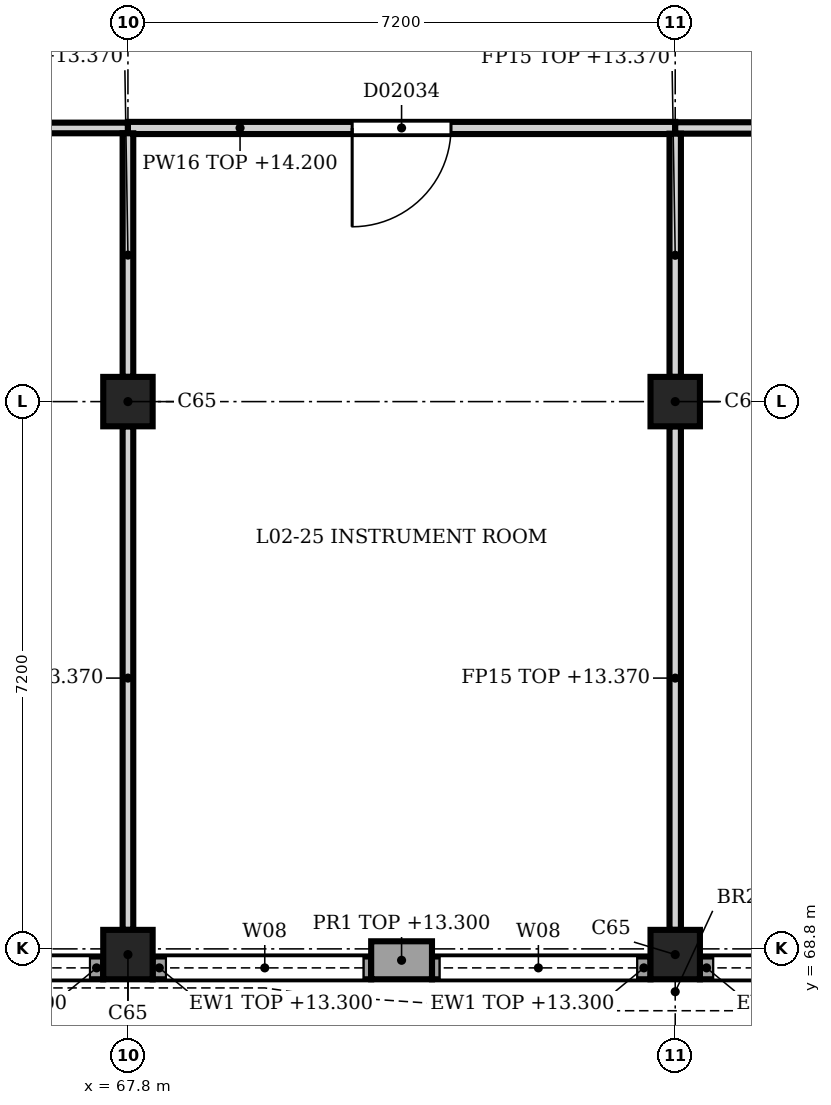
"""IFC4 building model, lengths in metres.
Left out: names, types, materials, properties, quantities, classifications, styles, units other than length and angle.
Written with IfcOpenShell. Run it as: python <this file> out.ifc"""

import sys

from ifc_helpers import new_model, si_unit, direction, frame, frame_2d, origin, origin_2d, place, context, subcontext, project, spatial, rectangle, extrude, element, fill, save


model = new_model("IFC4")
c1 = context("Model", 3, precision=1e-05, world=origin(), true_north=direction((0.0, 1.0)))
c2 = subcontext(c1, "Body", "Model", "MODEL_VIEW")
j1 = project(units=[si_unit("LENGTHUNIT", "METRE"), si_unit("PLANEANGLEUNIT", "RADIAN")], contexts=[c1])
p1 = place(None, origin())
s1 = spatial("IfcSite", under=j1, at=p1, CompositionType="ELEMENT")
p2 = place(p1, origin())
s2 = spatial("IfcBuilding", under=s1, at=p2, CompositionType="ELEMENT")
p3 = place(p2, frame((0.0, 0.0, 9.9)))
s3 = spatial("IfcBuildingStorey", under=s2, at=p3, CompositionType="ELEMENT", Elevation=9.9)
for number, where, z_axis, x_axis in (
    (1, (67.8, 68.725, 0.0), (0.0, 0.0, 1.0), (1.0, 0.0, 0.0)),
    (2, (67.8, 76.0, 0.0), (0.0, 0.0, 1.0), (1.0, 0.0, 0.0)),
    (3, (75.0, 68.725, 0.0), (0.0, 0.0, 1.0), (1.0, 0.0, 0.0)),
    (4, (75.0, 76.0, 0.0), (0.0, 0.0, 1.0), (1.0, 0.0, 0.0)),
):
    element("IfcColumn", number, at=place(p3, frame(where, z_axis=z_axis, x_axis=x_axis)), inside=s3, PredefinedType="COLUMN", context=c2, shape_type="SweptSolid", body=[
        extrude(rectangle(XDim=0.65, YDim=0.65, at=origin_2d()), origin(), (0.0, 0.0, 1.0), 4.5),
    ])
p4 = place(p3, frame((71.8, 68.65, 0.0), z_axis=(0.0, 0.0, 1.0), x_axis=(-1.0, 0.0, 0.0)))
e5 = element("IfcWall", 5, at=p4, inside=s3, PredefinedType="SOLIDWALL", context=c2, shape_type="SweptSolid", body=[
    extrude(rectangle(XDim=0.8, YDim=0.5, at=frame_2d((0.4, 0.0))), origin(), (0.0, 0.0, 1.0), 3.4),
])
p5 = place(p3, frame((78.2, 68.55, 0.0), z_axis=(0.0, 0.0, 1.0), x_axis=(-1.0, 0.0, 0.0)))
e6 = element("IfcWall", 6, at=p5, inside=s3, PredefinedType="SOLIDWALL", context=c2, shape_type="SweptSolid", body=[
    extrude(rectangle(XDim=2.875, YDim=0.3, at=frame_2d((1.438, 0.0))), origin(), (0.0, 0.0, 1.0), 3.4),
])
p6 = place(p5, frame((0.1, 0.0, 1.2)))
e7 = element("IfcOpeningElement", 7, at=p6, cuts=e6, PredefinedType="OPENING", context=c2, shape_type="SweptSolid", body=[
    extrude(rectangle(XDim=2.6, YDim=2.1, at=frame_2d((1.3, 1.05))), frame((0.0, 0.16, 0.0), z_axis=(0.0, -1.0, 0.0), x_axis=(1.0, 0.0, 0.0)), (0.0, 0.0, 1.0), 0.32),
])
p7 = place(p3, frame((74.675, 68.55, 0.0), z_axis=(0.0, 0.0, 1.0), x_axis=(-1.0, 0.0, 0.0)))
e8 = element("IfcWall", 8, at=p7, inside=s3, PredefinedType="SOLIDWALL", context=c2, shape_type="SweptSolid", body=[
    extrude(rectangle(XDim=2.875, YDim=0.3, at=frame_2d((1.438, 0.0))), origin(), (0.0, 0.0, 1.0), 3.4),
])
p8 = place(p7, frame((0.175, 0.0, 1.2)))
e9 = element("IfcOpeningElement", 9, at=p8, cuts=e8, PredefinedType="OPENING", context=c2, shape_type="SweptSolid", body=[
    extrude(rectangle(XDim=2.6, YDim=2.1, at=frame_2d((1.3, 1.05))), frame((0.0, 0.16, 0.0), z_axis=(0.0, -1.0, 0.0), x_axis=(1.0, 0.0, 0.0)), (0.0, 0.0, 1.0), 0.32),
])
p9 = place(p3, frame((71.0, 68.55, 0.0), z_axis=(0.0, 0.0, 1.0), x_axis=(-1.0, 0.0, 0.0)))
e10 = element("IfcWall", 10, at=p9, inside=s3, PredefinedType="SOLIDWALL", context=c2, shape_type="SweptSolid", body=[
    extrude(rectangle(XDim=2.875, YDim=0.3, at=frame_2d((1.438, 0.0))), origin(), (0.0, 0.0, 1.0), 3.4),
])
p10 = place(p9, frame((0.1, 0.0, 1.2)))
e11 = element("IfcOpeningElement", 11, at=p10, cuts=e10, PredefinedType="OPENING", context=c2, shape_type="SweptSolid", body=[
    extrude(rectangle(XDim=2.6, YDim=2.1, at=frame_2d((1.3, 1.05))), frame((0.0, 0.16, 0.0), z_axis=(0.0, -1.0, 0.0), x_axis=(1.0, 0.0, 0.0)), (0.0, 0.0, 1.0), 0.32),
])
p11 = place(p3, frame((67.475, 68.55, 0.0), z_axis=(0.0, 0.0, 1.0), x_axis=(-1.0, 0.0, 0.0)))
e12 = element("IfcWall", 12, at=p11, inside=s3, PredefinedType="SOLIDWALL", context=c2, shape_type="SweptSolid", body=[
    extrude(rectangle(XDim=2.875, YDim=0.3, at=frame_2d((1.438, 0.0))), origin(), (0.0, 0.0, 1.0), 3.4),
])
p12 = place(p11, frame((0.175, 0.0, 1.2)))
e13 = element("IfcOpeningElement", 13, at=p12, cuts=e12, PredefinedType="OPENING", context=c2, shape_type="SweptSolid", body=[
    extrude(rectangle(XDim=2.6, YDim=2.1, at=frame_2d((1.3, 1.05))), frame((0.0, 0.16, 0.0), z_axis=(0.0, -1.0, 0.0), x_axis=(1.0, 0.0, 0.0)), (0.0, 0.0, 1.0), 0.32),
])
p13 = place(p3, frame((67.8, 79.6, 0.0), z_axis=(0.0, 0.0, 1.0), x_axis=(-1.0, 0.0, 0.0)))
e14 = element("IfcWall", 14, at=p13, inside=s3, PredefinedType="PARTITIONING", context=c2, shape_type="SweptSolid", body=[
    extrude(rectangle(XDim=21.6, YDim=0.14, at=frame_2d((10.8, 0.0))), origin(), (0.0, 0.0, 1.0), 4.3),
])
p14 = place(p13, frame((10.25, 0.0, 0.0)))
e15 = element("IfcOpeningElement", 15, at=p14, cuts=e14, PredefinedType="OPENING", context=c2, shape_type="SweptSolid", body=[
    extrude(rectangle(XDim=1.2, YDim=2.1, at=frame_2d((0.6, 1.05))), frame((0.0, 0.08, 0.0), z_axis=(0.0, -1.0, 0.0), x_axis=(1.0, 0.0, 0.0)), (0.0, 0.0, 1.0), 0.16),
])
p15 = place(p3, frame((75.0, 79.6, 0.0), z_axis=(0.0, 0.0, 1.0), x_axis=(-1.0, 0.0, 0.0)))
e16 = element("IfcWall", 16, at=p15, inside=s3, PredefinedType="PARTITIONING", context=c2, shape_type="SweptSolid", body=[
    extrude(rectangle(XDim=7.2, YDim=0.16, at=frame_2d((3.6, 0.0))), origin(), (0.0, 0.0, 1.0), 4.3),
])
p16 = place(p15, frame((2.95, 0.0, 0.0)))
e17 = element("IfcOpeningElement", 17, at=p16, cuts=e16, PredefinedType="OPENING", context=c2, shape_type="SweptSolid", body=[
    extrude(rectangle(XDim=1.3, YDim=2.2, at=frame_2d((0.65, 1.1))), frame((0.0, 0.09, 0.0), z_axis=(0.0, -1.0, 0.0), x_axis=(1.0, 0.0, 0.0)), (0.0, 0.0, 1.0), 0.18),
])
p17 = place(p3, frame((82.2, 79.6, 0.0), z_axis=(0.0, 0.0, 1.0), x_axis=(-1.0, 0.0, 0.0)))
e18 = element("IfcWall", 18, at=p17, inside=s3, PredefinedType="PARTITIONING", context=c2, shape_type="SweptSolid", body=[
    extrude(rectangle(XDim=7.2, YDim=0.15, at=frame_2d((3.6, 0.0))), origin(), (0.0, 0.0, 1.0), 4.3),
])
p18 = place(p17, frame((3.15, 0.0, 0.0)))
e19 = element("IfcOpeningElement", 19, at=p18, cuts=e18, PredefinedType="OPENING", context=c2, shape_type="SweptSolid", body=[
    extrude(rectangle(XDim=1.0, YDim=2.1, at=frame_2d((0.5, 1.05))), frame((0.0, 0.085, 0.0), z_axis=(0.0, -1.0, 0.0), x_axis=(1.0, 0.0, 0.0)), (0.0, 0.0, 1.0), 0.17),
])
p19 = place(p3, frame((67.8, 69.05, 0.0), z_axis=(0.0, 0.0, 1.0), x_axis=(0.0, 1.0, 0.0)))
e20 = element("IfcWall", 20, at=p19, inside=s3, PredefinedType="PARTITIONING", context=c2, shape_type="SweptSolid", body=[
    extrude(rectangle(XDim=6.625, YDim=0.14, at=frame_2d((3.312, 0.0))), origin(), (0.0, 0.0, 1.0), 3.47),
])
p20 = place(p3, frame((67.8, 76.325, 0.0), z_axis=(0.0, 0.0, 1.0), x_axis=(0.0, 1.0, 0.0)))
e21 = element("IfcWall", 21, at=p20, inside=s3, PredefinedType="PARTITIONING", context=c2, shape_type="SweptSolid", body=[
    extrude(rectangle(XDim=3.205, YDim=0.14, at=frame_2d((1.603, 0.0))), origin(), (0.0, 0.0, 1.0), 3.47),
])
p21 = place(p3, frame((75.0, 69.05, 0.0), z_axis=(0.0, 0.0, 1.0), x_axis=(0.0, 1.0, 0.0)))
e22 = element("IfcWall", 22, at=p21, inside=s3, PredefinedType="PARTITIONING", context=c2, shape_type="SweptSolid", body=[
    extrude(rectangle(XDim=6.625, YDim=0.15, at=frame_2d((3.312, 0.0))), origin(), (0.0, 0.0, 1.0), 3.47),
])
p22 = place(p3, frame((75.0, 76.325, 0.0), z_axis=(0.0, 0.0, 1.0), x_axis=(0.0, 1.0, 0.0)))
e23 = element("IfcWall", 23, at=p22, inside=s3, PredefinedType="PARTITIONING", context=c2, shape_type="SweptSolid", body=[
    extrude(rectangle(XDim=3.2, YDim=0.15, at=frame_2d((1.6, 0.0))), origin(), (0.0, 0.0, 1.0), 3.47),
])
p23 = place(p6, origin())
e24 = element("IfcWindow", 24, at=p23, inside=s3, PartitioningType="SINGLE_PANEL", PredefinedType="WINDOW", context=c2, shape_type="SweptSolid", body=[
    extrude(rectangle(XDim=2.6, YDim=2.1, at=frame_2d((1.3, 1.05))), frame((0.0, 0.03, 0.0), z_axis=(0.0, -1.0, 0.0), x_axis=(1.0, 0.0, 0.0)), (0.0, 0.0, 1.0), 0.06),
])
fill(e7, e24)
p24 = place(p8, origin())
e25 = element("IfcWindow", 25, at=p24, inside=s3, PartitioningType="SINGLE_PANEL", PredefinedType="WINDOW", context=c2, shape_type="SweptSolid", body=[
    extrude(rectangle(XDim=2.6, YDim=2.1, at=frame_2d((1.3, 1.05))), frame((0.0, 0.03, 0.0), z_axis=(0.0, -1.0, 0.0), x_axis=(1.0, 0.0, 0.0)), (0.0, 0.0, 1.0), 0.06),
])
fill(e9, e25)
p25 = place(p10, origin())
e26 = element("IfcWindow", 26, at=p25, inside=s3, PartitioningType="SINGLE_PANEL", PredefinedType="WINDOW", context=c2, shape_type="SweptSolid", body=[
    extrude(rectangle(XDim=2.6, YDim=2.1, at=frame_2d((1.3, 1.05))), frame((0.0, 0.03, 0.0), z_axis=(0.0, -1.0, 0.0), x_axis=(1.0, 0.0, 0.0)), (0.0, 0.0, 1.0), 0.06),
])
fill(e11, e26)
p26 = place(p12, origin())
e27 = element("IfcWindow", 27, at=p26, inside=s3, PartitioningType="SINGLE_PANEL", PredefinedType="WINDOW", context=c2, shape_type="SweptSolid", body=[
    extrude(rectangle(XDim=2.6, YDim=2.1, at=frame_2d((1.3, 1.05))), frame((0.0, 0.03, 0.0), z_axis=(0.0, -1.0, 0.0), x_axis=(1.0, 0.0, 0.0)), (0.0, 0.0, 1.0), 0.06),
])
fill(e13, e27)
p27 = place(p16, origin())
e28 = element("IfcDoor", 28, at=p27, inside=s3, OperationType="SINGLE_SWING_LEFT", PredefinedType="DOOR", context=c2, shape_type="SweptSolid", body=[
    extrude(rectangle(XDim=1.3, YDim=2.2, at=frame_2d((0.65, 1.1))), frame((0.0, 0.025, 0.0), z_axis=(0.0, -1.0, 0.0), x_axis=(1.0, 0.0, 0.0)), (0.0, 0.0, 1.0), 0.05),
])
fill(e17, e28)
save(model, sys.argv[1])
